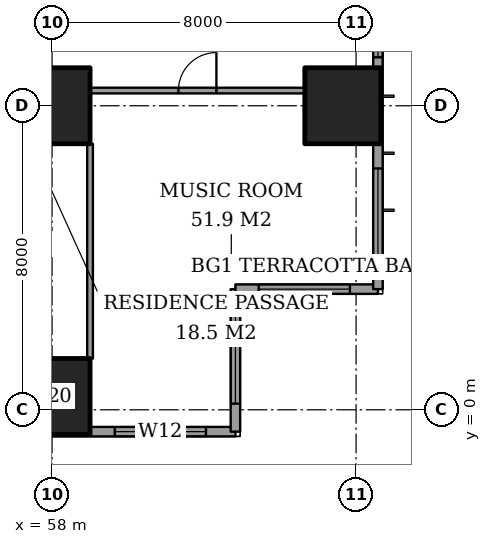
"""IFC4 building model, lengths in metres.
Left out: names, types, materials, properties, quantities, classifications, styles, units other than length and angle.
Written with IfcOpenShell. Run it as: python <this file> out.ifc"""

import sys

from ifc_helpers import new_model, si_unit, direction, frame, frame_2d, origin, origin_2d, place, context, subcontext, project, spatial, rectangle, extrude, element, fill, save


model = new_model("IFC4")
c1 = context("Model", 3, precision=1e-05, world=origin(), true_north=direction((0.0, 1.0)))
c2 = subcontext(c1, "Body", "Model", "MODEL_VIEW")
j1 = project(units=[si_unit("LENGTHUNIT", "METRE"), si_unit("PLANEANGLEUNIT", "RADIAN")], contexts=[c1])
p1 = place(None, origin())
s1 = spatial("IfcSite", under=j1, at=p1, CompositionType="ELEMENT")
p2 = place(p1, origin())
s2 = spatial("IfcBuilding", under=s1, at=p2, CompositionType="ELEMENT")
p3 = place(p2, frame((0.0, 0.0, 146.6)))
s3 = spatial("IfcBuildingStorey", under=s2, at=p3, CompositionType="ELEMENT", Elevation=146.6)
for number, where, z_axis, x_axis in (
    (1, (58.0, 0.35, 0.0), (0.0, 0.0, 1.0), (1.0, 0.0, 0.0)),
    (2, (58.0, 8.0, 0.0), (0.0, 0.0, 1.0), (1.0, 0.0, 0.0)),
    (3, (65.65, 8.0, 0.0), (0.0, 0.0, 1.0), (1.0, 0.0, 0.0)),
):
    element("IfcColumn", number, at=place(p3, frame(where, z_axis=z_axis, x_axis=x_axis)), inside=s3, PredefinedType="COLUMN", context=c2, shape_type="SweptSolid", body=[
        extrude(rectangle(XDim=2.0, YDim=2.0, at=origin_2d()), origin(), (0.0, 0.0, 1.0), 3.6),
    ])
p4 = place(p3, frame((41.425, -0.575, 0.0), z_axis=(0.0, 0.0, 1.0), x_axis=(1.0, 0.0, 0.0)))
e4 = element("IfcWall", 4, at=p4, inside=s3, PredefinedType="SOLIDWALL", context=c2, shape_type="SweptSolid", body=[
    extrude(rectangle(XDim=21.4, YDim=0.25, at=frame_2d((10.7, 0.0))), origin(), (0.0, 0.0, 1.0), 3.6),
])
p5 = place(p4, frame((3.05, 0.0, 0.4)))
e5 = element("IfcOpeningElement", 5, at=p5, cuts=e4, PredefinedType="OPENING", context=c2, shape_type="SweptSolid", body=[
    extrude(rectangle(XDim=2.4, YDim=2.2, at=frame_2d((1.2, 1.1))), frame((0.0, 0.135, 0.0), z_axis=(0.0, -1.0, 0.0), x_axis=(1.0, 0.0, 0.0)), (0.0, 0.0, 1.0), 0.27),
])
p6 = place(p4, frame((6.85, 0.0, 0.4)))
e6 = element("IfcOpeningElement", 6, at=p6, cuts=e4, PredefinedType="OPENING", context=c2, shape_type="SweptSolid", body=[
    extrude(rectangle(XDim=0.6, YDim=2.2, at=frame_2d((0.3, 1.1))), frame((0.0, 0.135, 0.0), z_axis=(0.0, -1.0, 0.0), x_axis=(1.0, 0.0, 0.0)), (0.0, 0.0, 1.0), 0.27),
])
p7 = place(p4, frame((9.975, 0.0, 0.4)))
e7 = element("IfcOpeningElement", 7, at=p7, cuts=e4, PredefinedType="OPENING", context=c2, shape_type="SweptSolid", body=[
    extrude(rectangle(XDim=1.2, YDim=2.2, at=frame_2d((0.6, 1.1))), frame((0.0, 0.135, 0.0), z_axis=(0.0, -1.0, 0.0), x_axis=(1.0, 0.0, 0.0)), (0.0, 0.0, 1.0), 0.27),
])
p8 = place(p4, frame((12.375, 0.0, 0.4)))
e8 = element("IfcOpeningElement", 8, at=p8, cuts=e4, PredefinedType="OPENING", context=c2, shape_type="SweptSolid", body=[
    extrude(rectangle(XDim=2.4, YDim=2.2, at=frame_2d((1.2, 1.1))), frame((0.0, 0.135, 0.0), z_axis=(0.0, -1.0, 0.0), x_axis=(1.0, 0.0, 0.0)), (0.0, 0.0, 1.0), 0.27),
])
p9 = place(p4, frame((18.225, 0.0, 0.4)))
e9 = element("IfcOpeningElement", 9, at=p9, cuts=e4, PredefinedType="OPENING", context=c2, shape_type="SweptSolid", body=[
    extrude(rectangle(XDim=2.4, YDim=2.2, at=frame_2d((1.2, 1.1))), frame((0.0, 0.135, 0.0), z_axis=(0.0, -1.0, 0.0), x_axis=(1.0, 0.0, 0.0)), (0.0, 0.0, 1.0), 0.27),
])
p10 = place(p3, frame((62.825, -0.575, 0.0), z_axis=(0.0, 0.0, 1.0), x_axis=(0.0, 1.0, 0.0)))
e10 = element("IfcWall", 10, at=p10, inside=s3, PredefinedType="SOLIDWALL", context=c2, shape_type="SweptSolid", body=[
    extrude(rectangle(XDim=3.75, YDim=0.25, at=frame_2d((1.875, 0.0))), origin(), (0.0, 0.0, 1.0), 3.6),
])
p11 = place(p10, frame((0.738, 0.0, 0.4)))
e11 = element("IfcOpeningElement", 11, at=p11, cuts=e10, PredefinedType="OPENING", context=c2, shape_type="SweptSolid", body=[
    extrude(rectangle(XDim=2.4, YDim=2.2, at=frame_2d((1.2, 1.1))), frame((0.0, 0.135, 0.0), z_axis=(0.0, -1.0, 0.0), x_axis=(1.0, 0.0, 0.0)), (0.0, 0.0, 1.0), 0.27),
])
p12 = place(p3, frame((62.825, 3.175, 0.0), z_axis=(0.0, 0.0, 1.0), x_axis=(1.0, 0.0, 0.0)))
e12 = element("IfcWall", 12, at=p12, inside=s3, PredefinedType="SOLIDWALL", context=c2, shape_type="SweptSolid", body=[
    extrude(rectangle(XDim=3.75, YDim=0.25, at=frame_2d((1.875, 0.0))), origin(), (0.0, 0.0, 1.0), 3.6),
])
p13 = place(p12, frame((0.613, 0.0, 0.4)))
e13 = element("IfcOpeningElement", 13, at=p13, cuts=e12, PredefinedType="OPENING", context=c2, shape_type="SweptSolid", body=[
    extrude(rectangle(XDim=2.4, YDim=2.2, at=frame_2d((1.2, 1.1))), frame((0.0, 0.135, 0.0), z_axis=(0.0, -1.0, 0.0), x_axis=(1.0, 0.0, 0.0)), (0.0, 0.0, 1.0), 0.27),
])
p14 = place(p3, frame((66.575, 3.175, 0.0), z_axis=(0.0, 0.0, 1.0), x_axis=(0.0, 1.0, 0.0)))
e14 = element("IfcWall", 14, at=p14, inside=s3, PredefinedType="SOLIDWALL", context=c2, shape_type="SweptSolid", body=[
    extrude(rectangle(XDim=41.65, YDim=0.25, at=frame_2d((20.825, 0.0))), origin(), (0.0, 0.0, 1.0), 3.6),
])
p15 = place(p14, frame((0.775, 0.0, 0.4)))
e15 = element("IfcOpeningElement", 15, at=p15, cuts=e14, PredefinedType="OPENING", context=c2, shape_type="SweptSolid", body=[
    extrude(rectangle(XDim=2.4, YDim=2.2, at=frame_2d((1.2, 1.1))), frame((0.0, 0.135, 0.0), z_axis=(0.0, -1.0, 0.0), x_axis=(1.0, 0.0, 0.0)), (0.0, 0.0, 1.0), 0.27),
])
p16 = place(p14, frame((6.1, 0.0, 0.4)))
e16 = element("IfcOpeningElement", 16, at=p16, cuts=e14, PredefinedType="OPENING", context=c2, shape_type="SweptSolid", body=[
    extrude(rectangle(XDim=1.2, YDim=2.2, at=frame_2d((0.6, 1.1))), frame((0.0, 0.135, 0.0), z_axis=(0.0, -1.0, 0.0), x_axis=(1.0, 0.0, 0.0)), (0.0, 0.0, 1.0), 0.27),
])
p17 = place(p14, frame((8.275, 0.0, 0.4)))
e17 = element("IfcOpeningElement", 17, at=p17, cuts=e14, PredefinedType="OPENING", context=c2, shape_type="SweptSolid", body=[
    extrude(rectangle(XDim=2.4, YDim=2.2, at=frame_2d((1.2, 1.1))), frame((0.0, 0.135, 0.0), z_axis=(0.0, -1.0, 0.0), x_axis=(1.0, 0.0, 0.0)), (0.0, 0.0, 1.0), 0.27),
])
p18 = place(p14, frame((15.775, 0.0, 0.4)))
e18 = element("IfcOpeningElement", 18, at=p18, cuts=e14, PredefinedType="OPENING", context=c2, shape_type="SweptSolid", body=[
    extrude(rectangle(XDim=2.4, YDim=2.2, at=frame_2d((1.2, 1.1))), frame((0.0, 0.135, 0.0), z_axis=(0.0, -1.0, 0.0), x_axis=(1.0, 0.0, 0.0)), (0.0, 0.0, 1.0), 0.27),
])
p19 = place(p14, frame((23.475, 0.0, 0.4)))
e19 = element("IfcOpeningElement", 19, at=p19, cuts=e14, PredefinedType="OPENING", context=c2, shape_type="SweptSolid", body=[
    extrude(rectangle(XDim=2.4, YDim=2.2, at=frame_2d((1.2, 1.1))), frame((0.0, 0.135, 0.0), z_axis=(0.0, -1.0, 0.0), x_axis=(1.0, 0.0, 0.0)), (0.0, 0.0, 1.0), 0.27),
])
p20 = place(p14, frame((30.875, 0.0, 0.4)))
e20 = element("IfcOpeningElement", 20, at=p20, cuts=e14, PredefinedType="OPENING", context=c2, shape_type="SweptSolid", body=[
    extrude(rectangle(XDim=2.4, YDim=2.2, at=frame_2d((1.2, 1.1))), frame((0.0, 0.135, 0.0), z_axis=(0.0, -1.0, 0.0), x_axis=(1.0, 0.0, 0.0)), (0.0, 0.0, 1.0), 0.27),
])
p21 = place(p14, frame((34.325, 0.0, 0.4)))
e21 = element("IfcOpeningElement", 21, at=p21, cuts=e14, PredefinedType="OPENING", context=c2, shape_type="SweptSolid", body=[
    extrude(rectangle(XDim=1.2, YDim=2.2, at=frame_2d((0.6, 1.1))), frame((0.0, 0.135, 0.0), z_axis=(0.0, -1.0, 0.0), x_axis=(1.0, 0.0, 0.0)), (0.0, 0.0, 1.0), 0.27),
])
p22 = place(p14, frame((38.475, 0.0, 0.4)))
e22 = element("IfcOpeningElement", 22, at=p22, cuts=e14, PredefinedType="OPENING", context=c2, shape_type="SweptSolid", body=[
    extrude(rectangle(XDim=2.4, YDim=2.2, at=frame_2d((1.2, 1.1))), frame((0.0, 0.135, 0.0), z_axis=(0.0, -1.0, 0.0), x_axis=(1.0, 0.0, 0.0)), (0.0, 0.0, 1.0), 0.27),
])
p23 = place(p3, frame((59.0, 8.4, 0.0), z_axis=(0.0, 0.0, 1.0), x_axis=(1.0, 0.0, 0.0)))
e23 = element("IfcWall", 23, at=p23, inside=s3, PredefinedType="PARTITIONING", context=c2, shape_type="SweptSolid", body=[
    extrude(rectangle(XDim=5.65, YDim=0.15, at=frame_2d((2.825, 0.0))), origin(), (0.0, 0.0, 1.0), 3.35),
])
p24 = place(p23, frame((2.325, 0.0, 0.0)))
e24 = element("IfcOpeningElement", 24, at=p24, cuts=e23, PredefinedType="OPENING", context=c2, shape_type="SweptSolid", body=[
    extrude(rectangle(XDim=1.0, YDim=2.1, at=frame_2d((0.5, 1.05))), frame((0.0, 0.085, 0.0), z_axis=(0.0, -1.0, 0.0), x_axis=(1.0, 0.0, 0.0)), (0.0, 0.0, 1.0), 0.17),
])
p25 = place(p3, frame((59.0, 1.35, 0.0), z_axis=(0.0, 0.0, 1.0), x_axis=(0.0, 1.0, 0.0)))
e25 = element("IfcWall", 25, at=p25, inside=s3, PredefinedType="PARTITIONING", context=c2, shape_type="SweptSolid", body=[
    extrude(rectangle(XDim=5.65, YDim=0.15, at=frame_2d((2.825, 0.0))), origin(), (0.0, 0.0, 1.0), 3.35),
])
p26 = place(p9, origin())
e26 = element("IfcWindow", 26, at=p26, inside=s3, PartitioningType="SINGLE_PANEL", PredefinedType="WINDOW", context=c2, shape_type="SweptSolid", body=[
    extrude(rectangle(XDim=2.4, YDim=2.2, at=frame_2d((1.2, 1.1))), frame((0.0, 0.03, 0.0), z_axis=(0.0, -1.0, 0.0), x_axis=(1.0, 0.0, 0.0)), (0.0, 0.0, 1.0), 0.06),
])
fill(e9, e26)
p27 = place(p11, origin())
e27 = element("IfcWindow", 27, at=p27, inside=s3, PartitioningType="SINGLE_PANEL", PredefinedType="WINDOW", context=c2, shape_type="SweptSolid", body=[
    extrude(rectangle(XDim=2.4, YDim=2.2, at=frame_2d((1.2, 1.1))), frame((0.0, 0.03, 0.0), z_axis=(0.0, -1.0, 0.0), x_axis=(1.0, 0.0, 0.0)), (0.0, 0.0, 1.0), 0.06),
])
fill(e11, e27)
p28 = place(p13, origin())
e28 = element("IfcWindow", 28, at=p28, inside=s3, PartitioningType="SINGLE_PANEL", PredefinedType="WINDOW", context=c2, shape_type="SweptSolid", body=[
    extrude(rectangle(XDim=2.4, YDim=2.2, at=frame_2d((1.2, 1.1))), frame((0.0, 0.03, 0.0), z_axis=(0.0, -1.0, 0.0), x_axis=(1.0, 0.0, 0.0)), (0.0, 0.0, 1.0), 0.06),
])
fill(e13, e28)
p29 = place(p15, origin())
e29 = element("IfcWindow", 29, at=p29, inside=s3, PartitioningType="SINGLE_PANEL", PredefinedType="WINDOW", context=c2, shape_type="SweptSolid", body=[
    extrude(rectangle(XDim=2.4, YDim=2.2, at=frame_2d((1.2, 1.1))), frame((0.0, 0.03, 0.0), z_axis=(0.0, -1.0, 0.0), x_axis=(1.0, 0.0, 0.0)), (0.0, 0.0, 1.0), 0.06),
])
fill(e15, e29)
p30 = place(p16, origin())
e30 = element("IfcWindow", 30, at=p30, inside=s3, PartitioningType="SINGLE_PANEL", PredefinedType="WINDOW", context=c2, shape_type="SweptSolid", body=[
    extrude(rectangle(XDim=1.2, YDim=2.2, at=frame_2d((0.6, 1.1))), frame((0.0, 0.03, 0.0), z_axis=(0.0, -1.0, 0.0), x_axis=(1.0, 0.0, 0.0)), (0.0, 0.0, 1.0), 0.06),
])
fill(e16, e30)
p31 = place(p24, origin())
e31 = element("IfcDoor", 31, at=p31, inside=s3, OperationType="SINGLE_SWING_LEFT", PredefinedType="DOOR", context=c2, shape_type="SweptSolid", body=[
    extrude(rectangle(XDim=1.0, YDim=2.1, at=frame_2d((0.5, 1.05))), frame((0.0, 0.025, 0.0), z_axis=(0.0, -1.0, 0.0), x_axis=(1.0, 0.0, 0.0)), (0.0, 0.0, 1.0), 0.05),
])
fill(e24, e31)
save(model, sys.argv[1])
